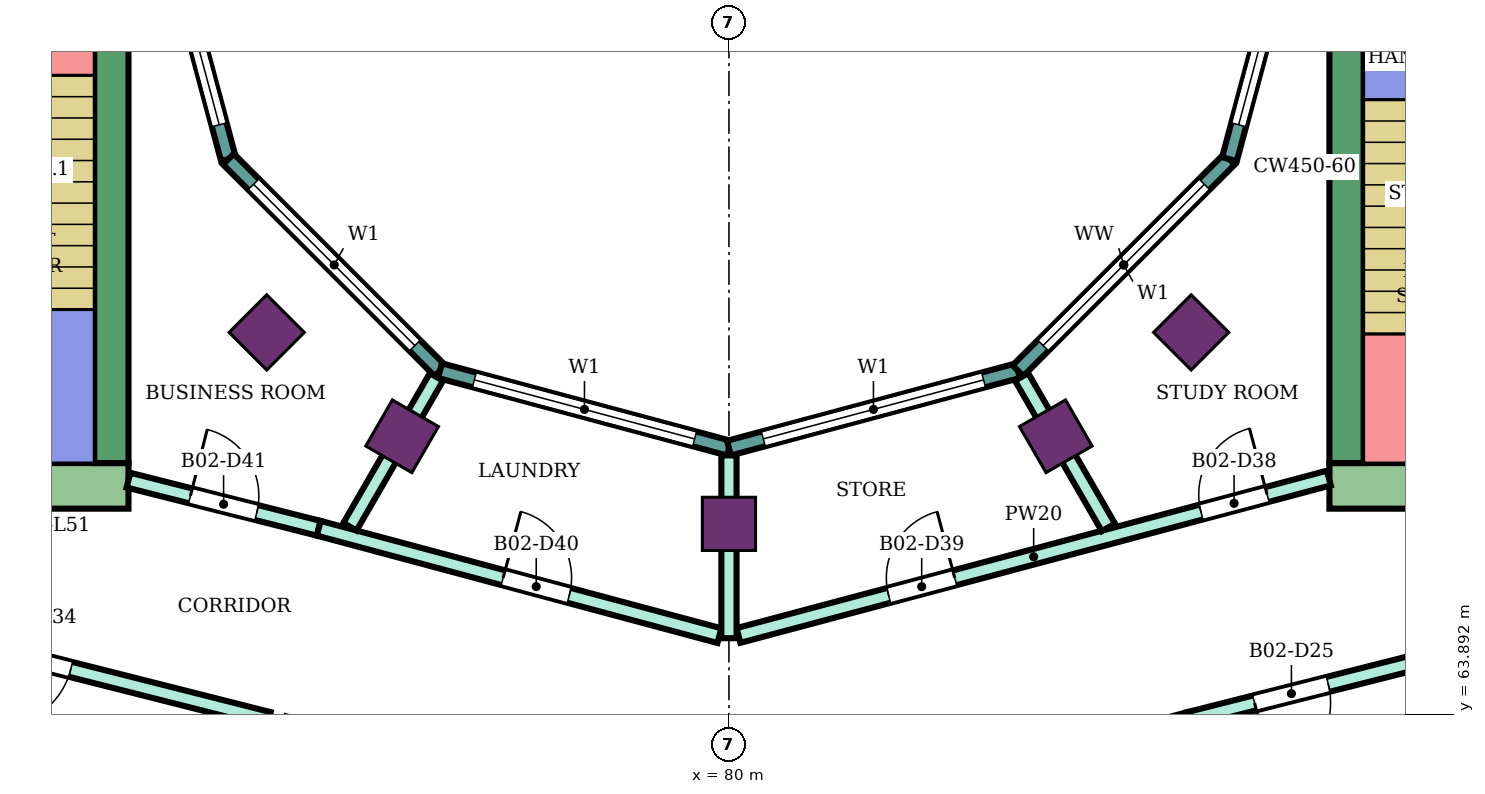
"""IFC4 building model, lengths in metres.
Left out: names, types, materials, properties, quantities, classifications, styles, units other than length and angle.
Written with IfcOpenShell. Run it as: python <this file> out.ifc"""

import sys

from ifc_helpers import new_model, si_unit, direction, frame, frame_2d, origin, origin_2d, place, context, subcontext, project, spatial, rectangle, extrude, element, fill, save


model = new_model("IFC4")
c1 = context("Model", 3, precision=1e-05, world=origin(), true_north=direction((0.0, 1.0)))
c2 = subcontext(c1, "Body", "Model", "MODEL_VIEW")
j1 = project(units=[si_unit("LENGTHUNIT", "METRE"), si_unit("PLANEANGLEUNIT", "RADIAN")], contexts=[c1])
p1 = place(None, origin())
s1 = spatial("IfcSite", under=j1, at=p1, CompositionType="ELEMENT")
p2 = place(p1, origin())
s2 = spatial("IfcBuilding", under=s1, at=p2, CompositionType="ELEMENT")
p3 = place(p2, frame((0.0, 0.0, 220.9)))
s3 = spatial("IfcBuildingStorey", under=s2, at=p3, CompositionType="ELEMENT", Elevation=220.9)
for number, where, z_axis, x_axis in (
    (1, (73.919, 68.919, 0.0), (0.0, 0.0, 1.0), (-0.707, -0.707, 0.0)),
    (2, (75.7, 67.552, 0.0), (0.0, 0.0, 1.0), (-0.5, -0.866, 0.0)),
    (3, (80.0, 66.4, 0.0), (0.0, 0.0, 1.0), (0.0, -1.0, 0.0)),
    (4, (84.3, 67.552, 0.0), (0.0, 0.0, 1.0), (0.5, -0.866, 0.0)),
    (5, (86.081, 68.919, 0.0), (0.0, 0.0, 1.0), (0.707, -0.707, 0.0)),
):
    element("IfcColumn", number, at=place(p3, frame(where, z_axis=z_axis, x_axis=x_axis)), inside=s3, PredefinedType="COLUMN", context=c2, shape_type="SweptSolid", body=[
        extrude(rectangle(XDim=0.7, YDim=0.7, at=origin_2d()), origin(), (0.0, 0.0, 1.0), 4.2),
    ])
p4 = place(p3, frame((87.9, 66.9, 0.0), z_axis=(0.0, 0.0, 1.0), x_axis=(1.0, 0.0, 0.0)))
e6 = element("IfcWall", 6, at=p4, inside=s3, PredefinedType="SHEAR", context=c2, shape_type="SweptSolid", body=[
    extrude(rectangle(XDim=14.9, YDim=0.6, at=frame_2d((7.45, 0.0))), origin(), (0.0, 0.0, 1.0), 3.88),
])
p5 = place(p4, frame((4.2, 0.0, 0.0)))
e7 = element("IfcOpeningElement", 7, at=p5, cuts=e6, PredefinedType="OPENING", context=c2, shape_type="SweptSolid", body=[
    extrude(rectangle(XDim=2.4, YDim=2.4, at=frame_2d((1.2, 1.2))), frame((0.0, 0.31, 0.0), z_axis=(0.0, -1.0, 0.0), x_axis=(1.0, 0.0, 0.0)), (0.0, 0.0, 1.0), 0.62),
])
p6 = place(p3, frame((88.125, 67.2, 0.0), z_axis=(0.0, 0.0, 1.0), x_axis=(0.0, 1.0, 0.0)))
e8 = element("IfcWall", 8, at=p6, inside=s3, PredefinedType="SHEAR", context=c2, shape_type="SweptSolid", body=[
    extrude(rectangle(XDim=7.8, YDim=0.45, at=frame_2d((3.9, 0.0))), origin(), (0.0, 0.0, 1.0), 3.88),
])
p7 = place(p3, frame((72.1, 66.9, 0.0), z_axis=(0.0, 0.0, 1.0), x_axis=(-1.0, 0.0, 0.0)))
e9 = element("IfcWall", 9, at=p7, inside=s3, PredefinedType="SHEAR", context=c2, shape_type="SweptSolid", body=[
    extrude(rectangle(XDim=14.9, YDim=0.6, at=frame_2d((7.45, 0.0))), origin(), (0.0, 0.0, 1.0), 3.88),
])
p8 = place(p7, frame((4.2, 0.0, 0.0)))
e10 = element("IfcOpeningElement", 10, at=p8, cuts=e9, PredefinedType="OPENING", context=c2, shape_type="SweptSolid", body=[
    extrude(rectangle(XDim=2.4, YDim=2.4, at=frame_2d((1.2, 1.2))), frame((0.0, 0.31, 0.0), z_axis=(0.0, -1.0, 0.0), x_axis=(1.0, 0.0, 0.0)), (0.0, 0.0, 1.0), 0.62),
])
p9 = place(p3, frame((71.875, 75.0, 0.0), z_axis=(0.0, 0.0, 1.0), x_axis=(0.0, -1.0, 0.0)))
e11 = element("IfcWall", 11, at=p9, inside=s3, PredefinedType="SHEAR", context=c2, shape_type="SweptSolid", body=[
    extrude(rectangle(XDim=7.8, YDim=0.45, at=frame_2d((3.9, 0.0))), origin(), (0.0, 0.0, 1.0), 3.88),
])
p10 = place(p3, frame((72.396, 75.0, 0.0), z_axis=(0.0, 0.0, 1.0), x_axis=(0.258789828301, -0.965933654434, 0.0)))
e12 = element("IfcWall", 12, at=p10, inside=s3, PredefinedType="NOTDEFINED", context=c2, shape_type="SweptSolid", body=[
    extrude(rectangle(XDim=3.936, YDim=0.2, at=frame_2d((1.968, 0.0))), origin(), (0.0, 0.0, 1.0), 4.2),
])
p11 = place(p10, frame((0.468, 0.0, 0.9)))
e13 = element("IfcOpeningElement", 13, at=p11, cuts=e12, PredefinedType="OPENING", context=c2, shape_type="SweptSolid", body=[
    extrude(rectangle(XDim=3.0, YDim=2.3, at=frame_2d((1.5, 1.15))), frame((0.0, 0.11, 0.0), z_axis=(0.0, -1.0, 0.0), x_axis=(1.0, 0.0, 0.0)), (0.0, 0.0, 1.0), 0.22),
])
p12 = place(p3, frame((73.415, 71.198, 0.0), z_axis=(0.0, 0.0, 1.0), x_axis=(0.707106781187, -0.707106781187, 0.0)))
e14 = element("IfcWall", 14, at=p12, inside=s3, PredefinedType="NOTDEFINED", context=c2, shape_type="SweptSolid", body=[
    extrude(rectangle(XDim=3.936, YDim=0.2, at=frame_2d((1.968, 0.0))), origin(), (0.0, 0.0, 1.0), 4.2),
])
p13 = place(p12, frame((0.468, 0.0, 0.9)))
e15 = element("IfcOpeningElement", 15, at=p13, cuts=e14, PredefinedType="OPENING", context=c2, shape_type="SweptSolid", body=[
    extrude(rectangle(XDim=3.0, YDim=2.3, at=frame_2d((1.5, 1.15))), frame((0.0, 0.11, 0.0), z_axis=(0.0, -1.0, 0.0), x_axis=(1.0, 0.0, 0.0)), (0.0, 0.0, 1.0), 0.22),
])
p14 = place(p3, frame((76.198, 68.415, 0.0), z_axis=(0.0, 0.0, 1.0), x_axis=(0.965933654434, -0.258789828301, 0.0)))
e16 = element("IfcWall", 16, at=p14, inside=s3, PredefinedType="NOTDEFINED", context=c2, shape_type="SweptSolid", body=[
    extrude(rectangle(XDim=3.936, YDim=0.2, at=frame_2d((1.968, 0.0))), origin(), (0.0, 0.0, 1.0), 4.2),
])
p15 = place(p14, frame((0.468, 0.0, 0.9)))
e17 = element("IfcOpeningElement", 17, at=p15, cuts=e16, PredefinedType="OPENING", context=c2, shape_type="SweptSolid", body=[
    extrude(rectangle(XDim=3.0, YDim=2.3, at=frame_2d((1.5, 1.15))), frame((0.0, 0.11, 0.0), z_axis=(0.0, -1.0, 0.0), x_axis=(1.0, 0.0, 0.0)), (0.0, 0.0, 1.0), 0.22),
])
p16 = place(p3, frame((80.0, 67.396, 0.0), z_axis=(0.0, 0.0, 1.0), x_axis=(0.965933654434, 0.258789828301, 0.0)))
e18 = element("IfcWall", 18, at=p16, inside=s3, PredefinedType="NOTDEFINED", context=c2, shape_type="SweptSolid", body=[
    extrude(rectangle(XDim=3.936, YDim=0.2, at=frame_2d((1.968, 0.0))), origin(), (0.0, 0.0, 1.0), 4.2),
])
p17 = place(p16, frame((0.468, 0.0, 0.9)))
e19 = element("IfcOpeningElement", 19, at=p17, cuts=e18, PredefinedType="OPENING", context=c2, shape_type="SweptSolid", body=[
    extrude(rectangle(XDim=3.0, YDim=2.3, at=frame_2d((1.5, 1.15))), frame((0.0, 0.11, 0.0), z_axis=(0.0, -1.0, 0.0), x_axis=(1.0, 0.0, 0.0)), (0.0, 0.0, 1.0), 0.22),
])
p18 = place(p3, frame((83.802, 68.415, 0.0), z_axis=(0.0, 0.0, 1.0), x_axis=(0.707106781187, 0.707106781187, 0.0)))
e20 = element("IfcWall", 20, at=p18, inside=s3, PredefinedType="NOTDEFINED", context=c2, shape_type="SweptSolid", body=[
    extrude(rectangle(XDim=3.936, YDim=0.2, at=frame_2d((1.968, 0.0))), origin(), (0.0, 0.0, 1.0), 4.2),
])
p19 = place(p18, frame((0.468, 0.0, 0.9)))
e21 = element("IfcOpeningElement", 21, at=p19, cuts=e20, PredefinedType="OPENING", context=c2, shape_type="SweptSolid", body=[
    extrude(rectangle(XDim=3.0, YDim=2.3, at=frame_2d((1.5, 1.15))), frame((0.0, 0.11, 0.0), z_axis=(0.0, -1.0, 0.0), x_axis=(1.0, 0.0, 0.0)), (0.0, 0.0, 1.0), 0.22),
])
p20 = place(p3, frame((86.585, 71.198, 0.0), z_axis=(0.0, 0.0, 1.0), x_axis=(0.258789828301, 0.965933654434, 0.0)))
e22 = element("IfcWall", 22, at=p20, inside=s3, PredefinedType="NOTDEFINED", context=c2, shape_type="SweptSolid", body=[
    extrude(rectangle(XDim=3.936, YDim=0.2, at=frame_2d((1.968, 0.0))), origin(), (0.0, 0.0, 1.0), 4.2),
])
p21 = place(p20, frame((0.468, 0.0, 0.9)))
e23 = element("IfcOpeningElement", 23, at=p21, cuts=e22, PredefinedType="OPENING", context=c2, shape_type="SweptSolid", body=[
    extrude(rectangle(XDim=3.0, YDim=2.3, at=frame_2d((1.5, 1.15))), frame((0.0, 0.11, 0.0), z_axis=(0.0, -1.0, 0.0), x_axis=(1.0, 0.0, 0.0)), (0.0, 0.0, 1.0), 0.22),
])
p22 = place(p3, frame((68.2, 65.28, 0.0), z_axis=(0.0, 0.0, 1.0), x_axis=(0.969450596516, -0.245286650503, 0.0)))
e24 = element("IfcWall", 24, at=p22, inside=s3, PredefinedType="PARTITIONING", context=c2, shape_type="SweptSolid", body=[
    extrude(rectangle(XDim=5.928, YDim=0.2, at=frame_2d((2.964, 0.0))), origin(), (0.0, 0.0, 1.0), 3.75),
])
p23 = place(p22, frame((2.24, 0.0, 0.0)))
e25 = element("IfcOpeningElement", 25, at=p23, cuts=e24, PredefinedType="OPENING", context=c2, shape_type="SweptSolid", body=[
    extrude(rectangle(XDim=1.0, YDim=2.1, at=frame_2d((0.5, 1.05))), frame((0.0, 0.11, 0.0), z_axis=(0.0, -1.0, 0.0), x_axis=(1.0, 0.0, 0.0)), (0.0, 0.0, 1.0), 0.22),
])
p24 = place(p3, frame((72.1, 66.975, 0.0), z_axis=(0.0, 0.0, 1.0), x_axis=(0.969471314457, -0.245204752086, 0.0)))
e26 = element("IfcWall", 26, at=p24, inside=s3, PredefinedType="PARTITIONING", context=c2, shape_type="SweptSolid", body=[
    extrude(rectangle(XDim=2.582, YDim=0.2, at=frame_2d((1.291, 0.0))), origin(), (0.0, 0.0, 1.0), 3.75),
])
p25 = place(p24, frame((0.841, 0.0, 0.0)))
e27 = element("IfcOpeningElement", 27, at=p25, cuts=e26, PredefinedType="OPENING", context=c2, shape_type="SweptSolid", body=[
    extrude(rectangle(XDim=0.9, YDim=2.1, at=frame_2d((0.45, 1.05))), frame((0.0, 0.11, 0.0), z_axis=(0.0, -1.0, 0.0), x_axis=(1.0, 0.0, 0.0)), (0.0, 0.0, 1.0), 0.22),
])
p26 = place(p3, frame((74.603, 66.342, 0.0), z_axis=(0.0, 0.0, 1.0), x_axis=(0.965920893652, -0.258837453254, 0.0)))
e28 = element("IfcWall", 28, at=p26, inside=s3, PredefinedType="PARTITIONING", context=c2, shape_type="SweptSolid", body=[
    extrude(rectangle(XDim=5.458, YDim=0.2, at=frame_2d((2.729, 0.0))), origin(), (0.0, 0.0, 1.0), 3.75),
])
p27 = place(p26, frame((2.512, 0.0, 0.0)))
e29 = element("IfcOpeningElement", 29, at=p27, cuts=e28, PredefinedType="OPENING", context=c2, shape_type="SweptSolid", body=[
    extrude(rectangle(XDim=0.9, YDim=2.1, at=frame_2d((0.45, 1.05))), frame((0.0, 0.11, 0.0), z_axis=(0.0, -1.0, 0.0), x_axis=(1.0, 0.0, 0.0)), (0.0, 0.0, 1.0), 0.22),
])
p28 = place(p3, frame((75.014, 66.362, 0.0), z_axis=(0.0, 0.0, 1.0), x_axis=(0.500143511652, 0.865942531438, 0.0)))
e30 = element("IfcWall", 30, at=p28, inside=s3, PredefinedType="PARTITIONING", context=c2, shape_type="SweptSolid", body=[
    extrude(rectangle(XDim=2.275, YDim=0.2, at=frame_2d((1.138, 0.0))), origin(), (0.0, 0.0, 1.0), 3.75),
])
p29 = place(p3, frame((80.125, 64.932, 0.0), z_axis=(0.0, 0.0, 1.0), x_axis=(0.966236955806, 0.257655089674, 0.0)))
e31 = element("IfcWall", 31, at=p29, inside=s3, PredefinedType="PARTITIONING", context=c2, shape_type="SweptSolid", body=[
    extrude(rectangle(XDim=8.039, YDim=0.2, at=frame_2d((4.02, 0.0))), origin(), (0.0, 0.0, 1.0), 3.75),
])
p30 = place(p29, frame((6.298, 0.0, 0.0)))
e32 = element("IfcOpeningElement", 32, at=p30, cuts=e31, PredefinedType="OPENING", context=c2, shape_type="SweptSolid", body=[
    extrude(rectangle(XDim=0.9, YDim=2.1, at=frame_2d((0.45, 1.05))), frame((0.0, 0.11, 0.0), z_axis=(0.0, -1.0, 0.0), x_axis=(1.0, 0.0, 0.0)), (0.0, 0.0, 1.0), 0.22),
])
p31 = place(p29, frame((2.045, 0.0, 0.0)))
e33 = element("IfcOpeningElement", 33, at=p31, cuts=e31, PredefinedType="OPENING", context=c2, shape_type="SweptSolid", body=[
    extrude(rectangle(XDim=0.9, YDim=2.1, at=frame_2d((0.45, 1.05))), frame((0.0, 0.11, 0.0), z_axis=(0.0, -1.0, 0.0), x_axis=(1.0, 0.0, 0.0)), (0.0, 0.0, 1.0), 0.22),
])
p32 = place(p3, frame((80.0, 62.204, 0.0), z_axis=(0.0, 0.0, 1.0), x_axis=(0.965938139786, 0.258773086132, 0.0)))
e34 = element("IfcWall", 34, at=p32, inside=s3, PredefinedType="PARTITIONING", context=c2, shape_type="SweptSolid", body=[
    extrude(rectangle(XDim=6.266, YDim=0.2, at=frame_2d((3.133, 0.0))), origin(), (0.0, 0.0, 1.0), 3.75),
])
p33 = place(p3, frame((80.0, 64.896, 0.0), z_axis=(0.0, 0.0, 1.0), x_axis=(0.0, 1.0, 0.0)))
e35 = element("IfcWall", 35, at=p33, inside=s3, PredefinedType="PARTITIONING", context=c2, shape_type="SweptSolid", body=[
    extrude(rectangle(XDim=2.405, YDim=0.2, at=frame_2d((1.203, 0.0))), origin(), (0.0, 0.0, 1.0), 3.75),
])
p34 = place(p3, frame((83.85, 68.333, 0.0), z_axis=(0.0, 0.0, 1.0), x_axis=(0.500080019051, -0.865979199835, 0.0)))
e36 = element("IfcWall", 36, at=p34, inside=s3, PredefinedType="PARTITIONING", context=c2, shape_type="SweptSolid", body=[
    extrude(rectangle(XDim=2.285, YDim=0.2, at=frame_2d((1.143, 0.0))), origin(), (0.0, 0.0, 1.0), 3.75),
])
p35 = place(p3, frame((86.053, 63.826, 0.0), z_axis=(0.0, 0.0, 1.0), x_axis=(0.969490004987, 0.245130843083, 0.0)))
e37 = element("IfcWall", 37, at=p35, inside=s3, PredefinedType="PARTITIONING", context=c2, shape_type="SweptSolid", body=[
    extrude(rectangle(XDim=5.908, YDim=0.2, at=frame_2d((2.954, 0.0))), origin(), (0.0, 0.0, 1.0), 3.75),
])
p36 = place(p35, frame((0.889, 0.0, 0.0)))
e38 = element("IfcOpeningElement", 38, at=p36, cuts=e37, PredefinedType="OPENING", context=c2, shape_type="SweptSolid", body=[
    extrude(rectangle(XDim=1.0, YDim=2.1, at=frame_2d((0.5, 1.05))), frame((0.0, 0.11, 0.0), z_axis=(0.0, -1.0, 0.0), x_axis=(1.0, 0.0, 0.0)), (0.0, 0.0, 1.0), 0.22),
])
p37 = place(p11, origin())
e39 = element("IfcWindow", 39, at=p37, inside=s3, PartitioningType="SINGLE_PANEL", PredefinedType="WINDOW", context=c2, shape_type="SweptSolid", body=[
    extrude(rectangle(XDim=3.0, YDim=2.3, at=frame_2d((1.5, 1.15))), frame((0.0, 0.03, 0.0), z_axis=(0.0, -1.0, 0.0), x_axis=(1.0, 0.0, 0.0)), (0.0, 0.0, 1.0), 0.06),
])
fill(e13, e39)
p38 = place(p13, origin())
e40 = element("IfcWindow", 40, at=p38, inside=s3, PartitioningType="SINGLE_PANEL", PredefinedType="WINDOW", context=c2, shape_type="SweptSolid", body=[
    extrude(rectangle(XDim=3.0, YDim=2.3, at=frame_2d((1.5, 1.15))), frame((0.0, 0.03, 0.0), z_axis=(0.0, -1.0, 0.0), x_axis=(1.0, 0.0, 0.0)), (0.0, 0.0, 1.0), 0.06),
])
fill(e15, e40)
p39 = place(p15, origin())
e41 = element("IfcWindow", 41, at=p39, inside=s3, PartitioningType="SINGLE_PANEL", PredefinedType="WINDOW", context=c2, shape_type="SweptSolid", body=[
    extrude(rectangle(XDim=3.0, YDim=2.3, at=frame_2d((1.5, 1.15))), frame((0.0, 0.03, 0.0), z_axis=(0.0, -1.0, 0.0), x_axis=(1.0, 0.0, 0.0)), (0.0, 0.0, 1.0), 0.06),
])
fill(e17, e41)
p40 = place(p17, origin())
e42 = element("IfcWindow", 42, at=p40, inside=s3, PartitioningType="SINGLE_PANEL", PredefinedType="WINDOW", context=c2, shape_type="SweptSolid", body=[
    extrude(rectangle(XDim=3.0, YDim=2.3, at=frame_2d((1.5, 1.15))), frame((0.0, 0.03, 0.0), z_axis=(0.0, -1.0, 0.0), x_axis=(1.0, 0.0, 0.0)), (0.0, 0.0, 1.0), 0.06),
])
fill(e19, e42)
p41 = place(p19, origin())
e43 = element("IfcWindow", 43, at=p41, inside=s3, PartitioningType="SINGLE_PANEL", PredefinedType="WINDOW", context=c2, shape_type="SweptSolid", body=[
    extrude(rectangle(XDim=3.0, YDim=2.3, at=frame_2d((1.5, 1.15))), frame((0.0, 0.03, 0.0), z_axis=(0.0, -1.0, 0.0), x_axis=(1.0, 0.0, 0.0)), (0.0, 0.0, 1.0), 0.06),
])
fill(e21, e43)
p42 = place(p21, origin())
e44 = element("IfcWindow", 44, at=p42, inside=s3, PartitioningType="SINGLE_PANEL", PredefinedType="WINDOW", context=c2, shape_type="SweptSolid", body=[
    extrude(rectangle(XDim=3.0, YDim=2.3, at=frame_2d((1.5, 1.15))), frame((0.0, 0.03, 0.0), z_axis=(0.0, -1.0, 0.0), x_axis=(1.0, 0.0, 0.0)), (0.0, 0.0, 1.0), 0.06),
])
fill(e23, e44)
p43 = place(p36, frame((1.0, 0.0, 0.0), z_axis=(0.0, 0.0, 1.0), x_axis=(-1.0, 0.0, 0.0)))
e45 = element("IfcDoor", 45, at=p43, inside=s3, OperationType="SINGLE_SWING_RIGHT", PredefinedType="DOOR", context=c2, shape_type="SweptSolid", body=[
    extrude(rectangle(XDim=1.0, YDim=2.1, at=frame_2d((0.5, 1.05))), frame((0.0, 0.025, 0.0), z_axis=(0.0, -1.0, 0.0), x_axis=(1.0, 0.0, 0.0)), (0.0, 0.0, 1.0), 0.05),
])
fill(e38, e45)
p44 = place(p23, frame((1.0, 0.0, 0.0), z_axis=(0.0, 0.0, 1.0), x_axis=(-1.0, 0.0, 0.0)))
e46 = element("IfcDoor", 46, at=p44, inside=s3, OperationType="SINGLE_SWING_RIGHT", PredefinedType="DOOR", context=c2, shape_type="SweptSolid", body=[
    extrude(rectangle(XDim=1.0, YDim=2.1, at=frame_2d((0.5, 1.05))), frame((0.0, 0.025, 0.0), z_axis=(0.0, -1.0, 0.0), x_axis=(1.0, 0.0, 0.0)), (0.0, 0.0, 1.0), 0.05),
])
fill(e25, e46)
p45 = place(p30, origin())
e47 = element("IfcDoor", 47, at=p45, inside=s3, OperationType="SINGLE_SWING_RIGHT", PredefinedType="DOOR", context=c2, shape_type="SweptSolid", body=[
    extrude(rectangle(XDim=0.9, YDim=2.1, at=frame_2d((0.45, 1.05))), frame((0.0, 0.025, 0.0), z_axis=(0.0, -1.0, 0.0), x_axis=(1.0, 0.0, 0.0)), (0.0, 0.0, 1.0), 0.05),
])
fill(e32, e47)
p46 = place(p31, origin())
e48 = element("IfcDoor", 48, at=p46, inside=s3, OperationType="SINGLE_SWING_RIGHT", PredefinedType="DOOR", context=c2, shape_type="SweptSolid", body=[
    extrude(rectangle(XDim=0.9, YDim=2.1, at=frame_2d((0.45, 1.05))), frame((0.0, 0.025, 0.0), z_axis=(0.0, -1.0, 0.0), x_axis=(1.0, 0.0, 0.0)), (0.0, 0.0, 1.0), 0.05),
])
fill(e33, e48)
p47 = place(p27, origin())
e49 = element("IfcDoor", 49, at=p47, inside=s3, OperationType="SINGLE_SWING_LEFT", PredefinedType="DOOR", context=c2, shape_type="SweptSolid", body=[
    extrude(rectangle(XDim=0.9, YDim=2.1, at=frame_2d((0.45, 1.05))), frame((0.0, 0.025, 0.0), z_axis=(0.0, -1.0, 0.0), x_axis=(1.0, 0.0, 0.0)), (0.0, 0.0, 1.0), 0.05),
])
fill(e29, e49)
p48 = place(p25, origin())
e50 = element("IfcDoor", 50, at=p48, inside=s3, OperationType="SINGLE_SWING_LEFT", PredefinedType="DOOR", context=c2, shape_type="SweptSolid", body=[
    extrude(rectangle(XDim=0.9, YDim=2.1, at=frame_2d((0.45, 1.05))), frame((0.0, 0.025, 0.0), z_axis=(0.0, -1.0, 0.0), x_axis=(1.0, 0.0, 0.0)), (0.0, 0.0, 1.0), 0.05),
])
fill(e27, e50)
save(model, sys.argv[1])
